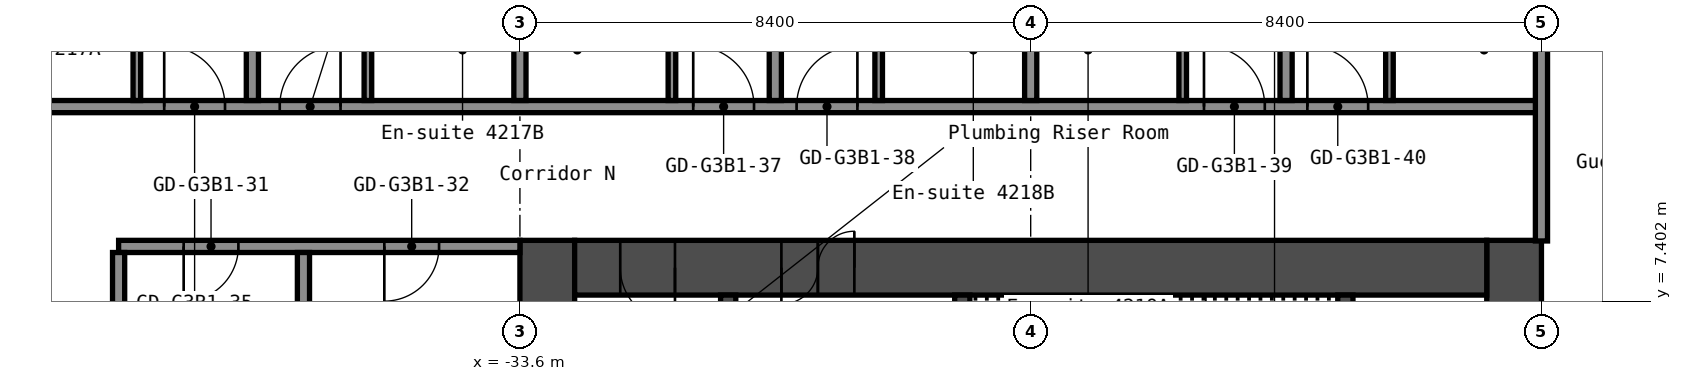
"""IFC4 building model, lengths in metres.
Left out: names, types, materials, properties, quantities, classifications, styles, units other than length and angle.
Written with IfcOpenShell. Run it as: python <this file> out.ifc"""

import sys

from ifc_helpers import new_model, si_unit, direction, frame, frame_2d, origin, place, context, subcontext, project, spatial, rectangle, extrude, element, fill, save


model = new_model("IFC4")
c1 = context("Model", 3, precision=1e-05, world=origin(), true_north=direction((0.0, 1.0)))
c2 = subcontext(c1, "Body", "Model", "MODEL_VIEW")
j1 = project(units=[si_unit("LENGTHUNIT", "METRE"), si_unit("PLANEANGLEUNIT", "RADIAN")], contexts=[c1])
p1 = place(None, origin())
s1 = spatial("IfcSite", under=j1, at=p1, CompositionType="ELEMENT")
p2 = place(p1, origin())
s2 = spatial("IfcBuilding", under=s1, at=p2, CompositionType="ELEMENT")
p3 = place(p2, frame((0.0, 0.0, 150.2)))
s3 = spatial("IfcBuildingStorey", under=s2, at=p3, CompositionType="ELEMENT", Elevation=150.2)
p4 = place(p3, frame((-17.25, -8.4, 0.0), z_axis=(0.0, 0.0, 1.0), x_axis=(0.0, 1.0, 0.0)))
e1 = element("IfcWall", 1, at=p4, inside=s3, PredefinedType="SHEAR", context=c2, shape_type="SweptSolid", body=[
    extrude(rectangle(XDim=16.8, YDim=0.9, at=frame_2d((8.4, 0.0))), origin(), (0.0, 0.0, 1.0), 2.75),
])
p5 = place(p4, frame((7.1, 0.0, 0.0)))
e2 = element("IfcOpeningElement", 2, at=p5, cuts=e1, PredefinedType="OPENING", context=c2, shape_type="SweptSolid", body=[
    extrude(rectangle(XDim=1.6, YDim=2.1, at=frame_2d((0.8, 1.05))), frame((0.0, 0.46, 0.0), z_axis=(0.0, -1.0, 0.0), x_axis=(1.0, 0.0, 0.0)), (0.0, 0.0, 1.0), 0.92),
])
p6 = place(p3, frame((-33.15, -8.4, 0.0), z_axis=(0.0, 0.0, 1.0), x_axis=(0.0, 1.0, 0.0)))
e3 = element("IfcWall", 3, at=p6, inside=s3, PredefinedType="SHEAR", context=c2, shape_type="SweptSolid", body=[
    extrude(rectangle(XDim=16.8, YDim=0.9, at=frame_2d((8.4, 0.0))), origin(), (0.0, 0.0, 1.0), 2.75),
])
p7 = place(p3, frame((-32.7, 7.95, 0.0), z_axis=(0.0, 0.0, 1.0), x_axis=(1.0, 0.0, 0.0)))
e4 = element("IfcWall", 4, at=p7, inside=s3, PredefinedType="SHEAR", context=c2, shape_type="SweptSolid", body=[
    extrude(rectangle(XDim=15.0, YDim=0.9, at=frame_2d((7.5, 0.0))), origin(), (0.0, 0.0, 1.0), 2.75),
])
p8 = place(p7, frame((3.4, 0.0, 0.0)))
e5 = element("IfcOpeningElement", 5, at=p8, cuts=e4, PredefinedType="OPENING", context=c2, shape_type="SweptSolid", body=[
    extrude(rectangle(XDim=1.2, YDim=2.1, at=frame_2d((0.6, 1.05))), frame((0.0, 0.46, 0.0), z_axis=(0.0, -1.0, 0.0), x_axis=(1.0, 0.0, 0.0)), (0.0, 0.0, 1.0), 0.92),
])
p9 = place(p7, frame((0.75, 0.0, 0.0)))
e6 = element("IfcOpeningElement", 6, at=p9, cuts=e4, PredefinedType="OPENING", context=c2, shape_type="SweptSolid", body=[
    extrude(rectangle(XDim=0.9, YDim=2.1, at=frame_2d((0.45, 1.05))), frame((0.0, 0.46, 0.0), z_axis=(0.0, -1.0, 0.0), x_axis=(1.0, 0.0, 0.0)), (0.0, 0.0, 1.0), 0.92),
])
p10 = place(p3, frame((-20.025, 1.2, 0.0), z_axis=(0.0, 0.0, 1.0), x_axis=(0.0, 1.0, 0.0)))
e7 = element("IfcWall", 7, at=p10, inside=s3, PredefinedType="SHEAR", context=c2, shape_type="SweptSolid", body=[
    extrude(rectangle(XDim=6.3, YDim=0.25, at=frame_2d((3.15, 0.0))), origin(), (0.0, 0.0, 1.0), 2.75),
])
p11 = place(p3, frame((-26.325, 3.75, 0.0), z_axis=(0.0, 0.0, 1.0), x_axis=(0.0, 1.0, 0.0)))
e8 = element("IfcWall", 8, at=p11, inside=s3, PredefinedType="SHEAR", context=c2, shape_type="SweptSolid", body=[
    extrude(rectangle(XDim=3.75, YDim=0.25, at=frame_2d((1.875, 0.0))), origin(), (0.0, 0.0, 1.0), 2.75),
])
p12 = place(p11, frame((1.25, 0.0, 0.0)))
e9 = element("IfcOpeningElement", 9, at=p12, cuts=e8, PredefinedType="OPENING", context=c2, shape_type="SweptSolid", body=[
    extrude(rectangle(XDim=1.2, YDim=2.1, at=frame_2d((0.6, 1.05))), frame((0.0, 0.135, 0.0), z_axis=(0.0, -1.0, 0.0), x_axis=(1.0, 0.0, 0.0)), (0.0, 0.0, 1.0), 0.27),
])
p13 = place(p3, frame((-30.175, 1.45, 0.0), z_axis=(0.0, 0.0, 1.0), x_axis=(0.0, 1.0, 0.0)))
e10 = element("IfcWall", 10, at=p13, inside=s3, PredefinedType="SHEAR", context=c2, shape_type="SweptSolid", body=[
    extrude(rectangle(XDim=6.05, YDim=0.25, at=frame_2d((3.025, 0.0))), origin(), (0.0, 0.0, 1.0), 2.75),
])
p14 = place(p13, frame((2.625, 0.0, 0.0)))
e11 = element("IfcOpeningElement", 11, at=p14, cuts=e10, PredefinedType="OPENING", context=c2, shape_type="SweptSolid", body=[
    extrude(rectangle(XDim=1.1, YDim=2.1, at=frame_2d((0.55, 1.05))), frame((0.0, 0.135, 0.0), z_axis=(0.0, -1.0, 0.0), x_axis=(1.0, 0.0, 0.0)), (0.0, 0.0, 1.0), 0.27),
])
p15 = place(p3, frame((-40.2, 8.3, 0.0), z_axis=(0.0, 0.0, 1.0), x_axis=(1.0, 0.0, 0.0)))
e12 = element("IfcWall", 12, at=p15, inside=s3, PredefinedType="PARTITIONING", context=c2, shape_type="SweptSolid", body=[
    extrude(rectangle(XDim=6.6, YDim=0.2, at=frame_2d((3.3, 0.0))), origin(), (0.0, 0.0, 1.0), 2.75),
])
p16 = place(p15, frame((1.07, 0.0, 0.0)))
e13 = element("IfcOpeningElement", 13, at=p16, cuts=e12, PredefinedType="OPENING", context=c2, shape_type="SweptSolid", body=[
    extrude(rectangle(XDim=0.9, YDim=2.1, at=frame_2d((0.45, 1.05))), frame((0.0, 0.11, 0.0), z_axis=(0.0, -1.0, 0.0), x_axis=(1.0, 0.0, 0.0)), (0.0, 0.0, 1.0), 0.22),
])
p17 = place(p15, frame((4.37, 0.0, 0.0)))
e14 = element("IfcOpeningElement", 14, at=p17, cuts=e12, PredefinedType="OPENING", context=c2, shape_type="SweptSolid", body=[
    extrude(rectangle(XDim=0.9, YDim=2.1, at=frame_2d((0.45, 1.05))), frame((0.0, 0.11, 0.0), z_axis=(0.0, -1.0, 0.0), x_axis=(1.0, 0.0, 0.0)), (0.0, 0.0, 1.0), 0.22),
])
p18 = place(p3, frame((-42.7, 10.6, 0.0), z_axis=(0.0, 0.0, 1.0), x_axis=(1.0, 0.0, 0.0)))
e15 = element("IfcWall", 15, at=p18, inside=s3, PredefinedType="PARTITIONING", context=c2, shape_type="SweptSolid", body=[
    extrude(rectangle(XDim=25.9, YDim=0.2, at=frame_2d((12.95, 0.0))), origin(), (0.0, 0.0, 1.0), 2.75),
])
p19 = place(p18, frame((3.25, 0.0, 0.0)))
e16 = element("IfcOpeningElement", 16, at=p19, cuts=e15, PredefinedType="OPENING", context=c2, shape_type="SweptSolid", body=[
    extrude(rectangle(XDim=1.0, YDim=2.1, at=frame_2d((0.5, 1.05))), frame((0.0, 0.11, 0.0), z_axis=(0.0, -1.0, 0.0), x_axis=(1.0, 0.0, 0.0)), (0.0, 0.0, 1.0), 0.22),
])
p20 = place(p18, frame((5.15, 0.0, 0.0)))
e17 = element("IfcOpeningElement", 17, at=p20, cuts=e15, PredefinedType="OPENING", context=c2, shape_type="SweptSolid", body=[
    extrude(rectangle(XDim=1.0, YDim=2.1, at=frame_2d((0.5, 1.05))), frame((0.0, 0.11, 0.0), z_axis=(0.0, -1.0, 0.0), x_axis=(1.0, 0.0, 0.0)), (0.0, 0.0, 1.0), 0.22),
])
p21 = place(p18, frame((11.95, 0.0, 0.0)))
e18 = element("IfcOpeningElement", 18, at=p21, cuts=e15, PredefinedType="OPENING", context=c2, shape_type="SweptSolid", body=[
    extrude(rectangle(XDim=1.0, YDim=2.1, at=frame_2d((0.5, 1.05))), frame((0.0, 0.11, 0.0), z_axis=(0.0, -1.0, 0.0), x_axis=(1.0, 0.0, 0.0)), (0.0, 0.0, 1.0), 0.22),
])
p22 = place(p18, frame((13.65, 0.0, 0.0)))
e19 = element("IfcOpeningElement", 19, at=p22, cuts=e15, PredefinedType="OPENING", context=c2, shape_type="SweptSolid", body=[
    extrude(rectangle(XDim=1.0, YDim=2.1, at=frame_2d((0.5, 1.05))), frame((0.0, 0.11, 0.0), z_axis=(0.0, -1.0, 0.0), x_axis=(1.0, 0.0, 0.0)), (0.0, 0.0, 1.0), 0.22),
])
p23 = place(p18, frame((20.35, 0.0, 0.0)))
e20 = element("IfcOpeningElement", 20, at=p23, cuts=e15, PredefinedType="OPENING", context=c2, shape_type="SweptSolid", body=[
    extrude(rectangle(XDim=1.0, YDim=2.1, at=frame_2d((0.5, 1.05))), frame((0.0, 0.11, 0.0), z_axis=(0.0, -1.0, 0.0), x_axis=(1.0, 0.0, 0.0)), (0.0, 0.0, 1.0), 0.22),
])
p24 = place(p18, frame((22.05, 0.0, 0.0)))
e21 = element("IfcOpeningElement", 21, at=p24, cuts=e15, PredefinedType="OPENING", context=c2, shape_type="SweptSolid", body=[
    extrude(rectangle(XDim=1.0, YDim=2.1, at=frame_2d((0.5, 1.05))), frame((0.0, 0.11, 0.0), z_axis=(0.0, -1.0, 0.0), x_axis=(1.0, 0.0, 0.0)), (0.0, 0.0, 1.0), 0.22),
])
p25 = place(p3, frame((-40.2, -8.2, 0.0), z_axis=(0.0, 0.0, 1.0), x_axis=(0.0, 1.0, 0.0)))
e22 = element("IfcWall", 22, at=p25, inside=s3, PredefinedType="PARTITIONING", context=c2, shape_type="SweptSolid", body=[
    extrude(rectangle(XDim=16.4, YDim=0.2, at=frame_2d((8.2, 0.0))), origin(), (0.0, 0.0, 1.0), 2.75),
])
p26 = place(p3, frame((-39.9, 10.7, 0.0), z_axis=(0.0, 0.0, 1.0), x_axis=(0.0, 1.0, 0.0)))
e23 = element("IfcWall", 23, at=p26, inside=s3, PredefinedType="PARTITIONING", context=c2, shape_type="SweptSolid", body=[
    extrude(rectangle(XDim=2.9, YDim=0.125, at=frame_2d((1.45, 0.0))), origin(), (0.0, 0.0, 1.0), 2.75),
])
p27 = place(p26, frame((1.5, 0.0, 0.0)))
e24 = element("IfcOpeningElement", 24, at=p27, cuts=e23, PredefinedType="OPENING", context=c2, shape_type="SweptSolid", body=[
    extrude(rectangle(XDim=0.8, YDim=2.1, at=frame_2d((0.4, 1.05))), frame((0.0, 0.073, 0.0), z_axis=(0.0, -1.0, 0.0), x_axis=(1.0, 0.0, 0.0)), (0.0, 0.0, 1.0), 0.145),
])
p28 = place(p3, frame((-38.0, 10.7, 0.0), z_axis=(0.0, 0.0, 1.0), x_axis=(0.0, 1.0, 0.0)))
e25 = element("IfcWall", 25, at=p28, inside=s3, PredefinedType="PARTITIONING", context=c2, shape_type="SweptSolid", body=[
    extrude(rectangle(XDim=7.6, YDim=0.2, at=frame_2d((3.8, 0.0))), origin(), (0.0, 0.0, 1.0), 2.75),
])
p29 = place(p3, frame((-37.16, 0.0, 0.0), z_axis=(0.0, 0.0, 1.0), x_axis=(0.0, 1.0, 0.0)))
e26 = element("IfcWall", 26, at=p29, inside=s3, PredefinedType="PARTITIONING", context=c2, shape_type="SweptSolid", body=[
    extrude(rectangle(XDim=8.2, YDim=0.2, at=frame_2d((4.1, 0.0))), origin(), (0.0, 0.0, 1.0), 2.75),
])
p30 = place(p3, frame((-36.1, 10.7, 0.0), z_axis=(0.0, 0.0, 1.0), x_axis=(0.0, 1.0, 0.0)))
e27 = element("IfcWall", 27, at=p30, inside=s3, PredefinedType="PARTITIONING", context=c2, shape_type="SweptSolid", body=[
    extrude(rectangle(XDim=2.9, YDim=0.125, at=frame_2d((1.45, 0.0))), origin(), (0.0, 0.0, 1.0), 2.75),
])
p31 = place(p30, frame((1.5, 0.0, 0.0)))
e28 = element("IfcOpeningElement", 28, at=p31, cuts=e27, PredefinedType="OPENING", context=c2, shape_type="SweptSolid", body=[
    extrude(rectangle(XDim=0.8, YDim=2.1, at=frame_2d((0.4, 1.05))), frame((0.0, 0.073, 0.0), z_axis=(0.0, -1.0, 0.0), x_axis=(1.0, 0.0, 0.0)), (0.0, 0.0, 1.0), 0.145),
])
p32 = place(p3, frame((-33.6, 10.7, 0.0), z_axis=(0.0, 0.0, 1.0), x_axis=(0.0, 1.0, 0.0)))
e29 = element("IfcWall", 29, at=p32, inside=s3, PredefinedType="PARTITIONING", context=c2, shape_type="SweptSolid", body=[
    extrude(rectangle(XDim=7.6, YDim=0.2, at=frame_2d((3.8, 0.0))), origin(), (0.0, 0.0, 1.0), 2.75),
])
p33 = place(p3, frame((-31.1, 10.7, 0.0), z_axis=(0.0, 0.0, 1.0), x_axis=(0.0, 1.0, 0.0)))
e30 = element("IfcWall", 30, at=p33, inside=s3, PredefinedType="PARTITIONING", context=c2, shape_type="SweptSolid", body=[
    extrude(rectangle(XDim=2.9, YDim=0.125, at=frame_2d((1.45, 0.0))), origin(), (0.0, 0.0, 1.0), 2.75),
])
p34 = place(p33, frame((1.5, 0.0, 0.0)))
e31 = element("IfcOpeningElement", 31, at=p34, cuts=e30, PredefinedType="OPENING", context=c2, shape_type="SweptSolid", body=[
    extrude(rectangle(XDim=0.8, YDim=2.1, at=frame_2d((0.4, 1.05))), frame((0.0, 0.073, 0.0), z_axis=(0.0, -1.0, 0.0), x_axis=(1.0, 0.0, 0.0)), (0.0, 0.0, 1.0), 0.145),
])
p35 = place(p3, frame((-29.4, 10.7, 0.0), z_axis=(0.0, 0.0, 1.0), x_axis=(0.0, 1.0, 0.0)))
e32 = element("IfcWall", 32, at=p35, inside=s3, PredefinedType="PARTITIONING", context=c2, shape_type="SweptSolid", body=[
    extrude(rectangle(XDim=7.6, YDim=0.2, at=frame_2d((3.8, 0.0))), origin(), (0.0, 0.0, 1.0), 2.75),
])
p36 = place(p3, frame((-27.7, 10.7, 0.0), z_axis=(0.0, 0.0, 1.0), x_axis=(0.0, 1.0, 0.0)))
e33 = element("IfcWall", 33, at=p36, inside=s3, PredefinedType="PARTITIONING", context=c2, shape_type="SweptSolid", body=[
    extrude(rectangle(XDim=2.9, YDim=0.125, at=frame_2d((1.45, 0.0))), origin(), (0.0, 0.0, 1.0), 2.75),
])
p37 = place(p36, frame((1.5, 0.0, 0.0)))
e34 = element("IfcOpeningElement", 34, at=p37, cuts=e33, PredefinedType="OPENING", context=c2, shape_type="SweptSolid", body=[
    extrude(rectangle(XDim=0.8, YDim=2.1, at=frame_2d((0.4, 1.05))), frame((0.0, 0.073, 0.0), z_axis=(0.0, -1.0, 0.0), x_axis=(1.0, 0.0, 0.0)), (0.0, 0.0, 1.0), 0.145),
])
p38 = place(p3, frame((-25.2, 10.7, 0.0), z_axis=(0.0, 0.0, 1.0), x_axis=(0.0, 1.0, 0.0)))
e35 = element("IfcWall", 35, at=p38, inside=s3, PredefinedType="PARTITIONING", context=c2, shape_type="SweptSolid", body=[
    extrude(rectangle(XDim=7.6, YDim=0.2, at=frame_2d((3.8, 0.0))), origin(), (0.0, 0.0, 1.0), 2.75),
])
p39 = place(p3, frame((-22.7, 10.7, 0.0), z_axis=(0.0, 0.0, 1.0), x_axis=(0.0, 1.0, 0.0)))
e36 = element("IfcWall", 36, at=p39, inside=s3, PredefinedType="PARTITIONING", context=c2, shape_type="SweptSolid", body=[
    extrude(rectangle(XDim=2.9, YDim=0.125, at=frame_2d((1.45, 0.0))), origin(), (0.0, 0.0, 1.0), 2.75),
])
p40 = place(p39, frame((1.5, 0.0, 0.0)))
e37 = element("IfcOpeningElement", 37, at=p40, cuts=e36, PredefinedType="OPENING", context=c2, shape_type="SweptSolid", body=[
    extrude(rectangle(XDim=0.8, YDim=2.1, at=frame_2d((0.4, 1.05))), frame((0.0, 0.073, 0.0), z_axis=(0.0, -1.0, 0.0), x_axis=(1.0, 0.0, 0.0)), (0.0, 0.0, 1.0), 0.145),
])
p41 = place(p3, frame((-21.0, 10.7, 0.0), z_axis=(0.0, 0.0, 1.0), x_axis=(0.0, 1.0, 0.0)))
e38 = element("IfcWall", 38, at=p41, inside=s3, PredefinedType="PARTITIONING", context=c2, shape_type="SweptSolid", body=[
    extrude(rectangle(XDim=7.6, YDim=0.2, at=frame_2d((3.8, 0.0))), origin(), (0.0, 0.0, 1.0), 2.75),
])
p42 = place(p3, frame((-19.3, 10.7, 0.0), z_axis=(0.0, 0.0, 1.0), x_axis=(0.0, 1.0, 0.0)))
e39 = element("IfcWall", 39, at=p42, inside=s3, PredefinedType="PARTITIONING", context=c2, shape_type="SweptSolid", body=[
    extrude(rectangle(XDim=2.9, YDim=0.125, at=frame_2d((1.45, 0.0))), origin(), (0.0, 0.0, 1.0), 2.75),
])
p43 = place(p42, frame((1.5, 0.0, 0.0)))
e40 = element("IfcOpeningElement", 40, at=p43, cuts=e39, PredefinedType="OPENING", context=c2, shape_type="SweptSolid", body=[
    extrude(rectangle(XDim=0.8, YDim=2.1, at=frame_2d((0.4, 1.05))), frame((0.0, 0.073, 0.0), z_axis=(0.0, -1.0, 0.0), x_axis=(1.0, 0.0, 0.0)), (0.0, 0.0, 1.0), 0.145),
])
p44 = place(p3, frame((-16.8, 8.39, 0.0), z_axis=(0.0, 0.0, 1.0), x_axis=(0.0, 1.0, 0.0)))
e41 = element("IfcWall", 41, at=p44, inside=s3, PredefinedType="PARTITIONING", context=c2, shape_type="SweptSolid", body=[
    extrude(rectangle(XDim=9.91, YDim=0.2, at=frame_2d((4.955, 0.0))), origin(), (0.0, 0.0, 1.0), 2.75),
])
p45 = place(p8, origin())
e42 = element("IfcDoor", 42, at=p45, inside=s3, OperationType="DOUBLE_DOOR_SINGLE_SWING", PredefinedType="DOOR", context=c2, shape_type="SweptSolid", body=[
    extrude(rectangle(XDim=1.2, YDim=2.1, at=frame_2d((0.6, 1.05))), frame((0.0, 0.025, 0.0), z_axis=(0.0, -1.0, 0.0), x_axis=(1.0, 0.0, 0.0)), (0.0, 0.0, 1.0), 0.05),
])
fill(e5, e42)
p46 = place(p9, origin())
e43 = element("IfcDoor", 43, at=p46, inside=s3, OperationType="SINGLE_SWING_RIGHT", PredefinedType="DOOR", context=c2, shape_type="SweptSolid", body=[
    extrude(rectangle(XDim=0.9, YDim=2.1, at=frame_2d((0.45, 1.05))), frame((0.0, 0.025, 0.0), z_axis=(0.0, -1.0, 0.0), x_axis=(1.0, 0.0, 0.0)), (0.0, 0.0, 1.0), 0.05),
])
fill(e6, e43)
p47 = place(p16, origin())
e44 = element("IfcDoor", 44, at=p47, inside=s3, OperationType="SINGLE_SWING_LEFT", PredefinedType="DOOR", context=c2, shape_type="SweptSolid", body=[
    extrude(rectangle(XDim=0.9, YDim=2.1, at=frame_2d((0.45, 1.05))), frame((0.0, 0.025, 0.0), z_axis=(0.0, -1.0, 0.0), x_axis=(1.0, 0.0, 0.0)), (0.0, 0.0, 1.0), 0.05),
])
fill(e13, e44)
p48 = place(p17, origin())
e45 = element("IfcDoor", 45, at=p48, inside=s3, OperationType="SINGLE_SWING_LEFT", PredefinedType="DOOR", context=c2, shape_type="SweptSolid", body=[
    extrude(rectangle(XDim=0.9, YDim=2.1, at=frame_2d((0.45, 1.05))), frame((0.0, 0.025, 0.0), z_axis=(0.0, -1.0, 0.0), x_axis=(1.0, 0.0, 0.0)), (0.0, 0.0, 1.0), 0.05),
])
fill(e14, e45)
p49 = place(p19, origin())
e46 = element("IfcDoor", 46, at=p49, inside=s3, OperationType="SINGLE_SWING_RIGHT", PredefinedType="DOOR", context=c2, shape_type="SweptSolid", body=[
    extrude(rectangle(XDim=1.0, YDim=2.1, at=frame_2d((0.5, 1.05))), frame((0.0, 0.025, 0.0), z_axis=(0.0, -1.0, 0.0), x_axis=(1.0, 0.0, 0.0)), (0.0, 0.0, 1.0), 0.05),
])
fill(e16, e46)
p50 = place(p20, origin())
e47 = element("IfcDoor", 47, at=p50, inside=s3, OperationType="SINGLE_SWING_LEFT", PredefinedType="DOOR", context=c2, shape_type="SweptSolid", body=[
    extrude(rectangle(XDim=1.0, YDim=2.1, at=frame_2d((0.5, 1.05))), frame((0.0, 0.025, 0.0), z_axis=(0.0, -1.0, 0.0), x_axis=(1.0, 0.0, 0.0)), (0.0, 0.0, 1.0), 0.05),
])
fill(e17, e47)
p51 = place(p21, origin())
e48 = element("IfcDoor", 48, at=p51, inside=s3, OperationType="SINGLE_SWING_RIGHT", PredefinedType="DOOR", context=c2, shape_type="SweptSolid", body=[
    extrude(rectangle(XDim=1.0, YDim=2.1, at=frame_2d((0.5, 1.05))), frame((0.0, 0.025, 0.0), z_axis=(0.0, -1.0, 0.0), x_axis=(1.0, 0.0, 0.0)), (0.0, 0.0, 1.0), 0.05),
])
fill(e18, e48)
p52 = place(p22, origin())
e49 = element("IfcDoor", 49, at=p52, inside=s3, OperationType="SINGLE_SWING_LEFT", PredefinedType="DOOR", context=c2, shape_type="SweptSolid", body=[
    extrude(rectangle(XDim=1.0, YDim=2.1, at=frame_2d((0.5, 1.05))), frame((0.0, 0.025, 0.0), z_axis=(0.0, -1.0, 0.0), x_axis=(1.0, 0.0, 0.0)), (0.0, 0.0, 1.0), 0.05),
])
fill(e19, e49)
p53 = place(p23, origin())
e50 = element("IfcDoor", 50, at=p53, inside=s3, OperationType="SINGLE_SWING_RIGHT", PredefinedType="DOOR", context=c2, shape_type="SweptSolid", body=[
    extrude(rectangle(XDim=1.0, YDim=2.1, at=frame_2d((0.5, 1.05))), frame((0.0, 0.025, 0.0), z_axis=(0.0, -1.0, 0.0), x_axis=(1.0, 0.0, 0.0)), (0.0, 0.0, 1.0), 0.05),
])
fill(e20, e50)
p54 = place(p24, origin())
e51 = element("IfcDoor", 51, at=p54, inside=s3, OperationType="SINGLE_SWING_RIGHT", PredefinedType="DOOR", context=c2, shape_type="SweptSolid", body=[
    extrude(rectangle(XDim=1.0, YDim=2.1, at=frame_2d((0.5, 1.05))), frame((0.0, 0.025, 0.0), z_axis=(0.0, -1.0, 0.0), x_axis=(1.0, 0.0, 0.0)), (0.0, 0.0, 1.0), 0.05),
])
fill(e21, e51)
save(model, sys.argv[1])
